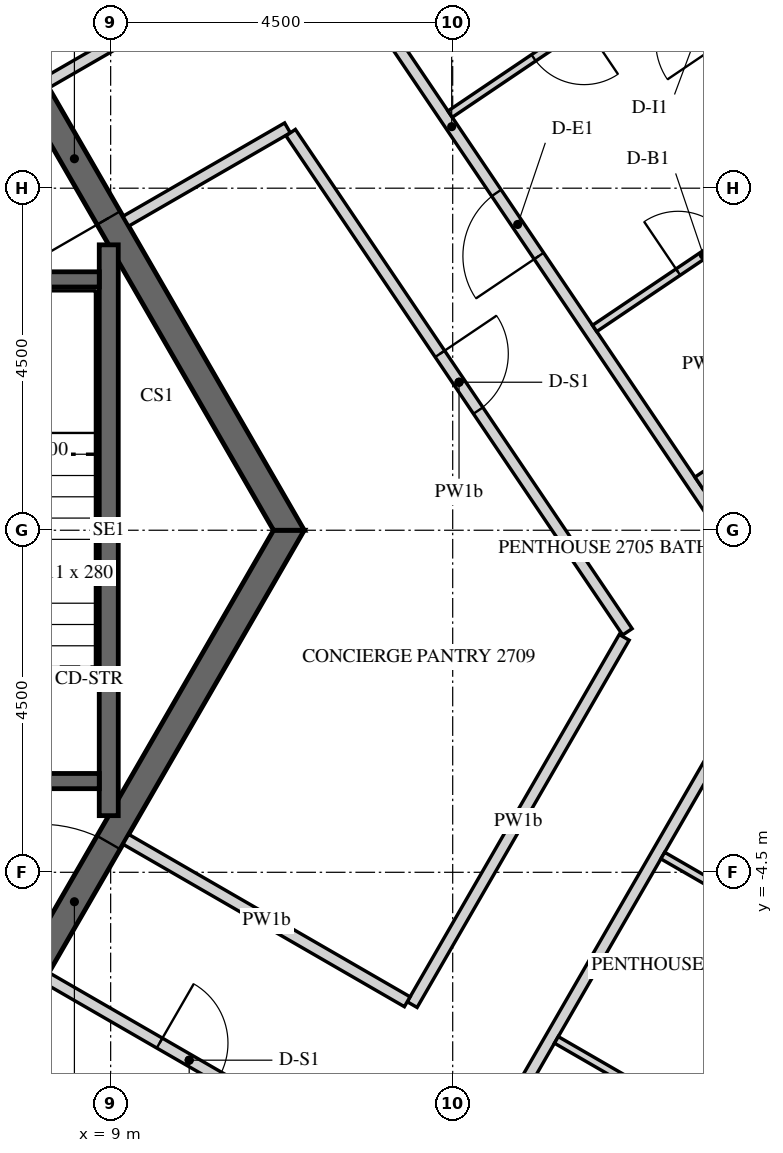
"""IFC4 building model, lengths in metres.
Left out: names, types, materials, properties, quantities, classifications, styles, units other than length and angle.
Written with IfcOpenShell. Run it as: python <this file> out.ifc"""

import sys

from ifc_helpers import new_model, si_unit, direction, frame, frame_2d, origin, place, context, subcontext, project, spatial, polyline, rectangle, outline, extrude, element, fill, save


model = new_model("IFC4")
c1 = context("Model", 3, precision=1e-05, world=origin(), true_north=direction((0.0, 1.0)))
c2 = subcontext(c1, "Body", "Model", "MODEL_VIEW")
j1 = project(units=[si_unit("LENGTHUNIT", "METRE"), si_unit("PLANEANGLEUNIT", "RADIAN")], contexts=[c1])
p1 = place(None, origin())
s1 = spatial("IfcSite", under=j1, at=p1, CompositionType="ELEMENT")
p2 = place(p1, origin())
s2 = spatial("IfcBuilding", under=s1, at=p2, CompositionType="ELEMENT")
p3 = place(p2, frame((0.0, 0.0, 353.4)))
s3 = spatial("IfcBuildingStorey", under=s2, at=p3, CompositionType="ELEMENT", Elevation=353.4)
p4 = place(p3, frame((15.273, -21.097, -0.15), z_axis=(0.0, 0.0, 1.0), x_axis=(0.499997453958, 0.866026873738, 0.0)))
e1 = element("IfcWall", 1, at=p4, inside=s3, PredefinedType="SOLIDWALL", context=c2, shape_type="SweptSolid", body=[
    extrude(outline(polyline([(-0.018, -0.225), (23.152, -0.225), (23.11, 0.225), (0.018, 0.225), (-0.018, -0.225)])), origin(), (0.0, 0.0, 1.0), 3.9),
])
p5 = place(p4, frame((1.366, 0.0, 0.45)))
e2 = element("IfcOpeningElement", 2, at=p5, cuts=e1, PredefinedType="OPENING", context=c2, shape_type="SweptSolid", body=[
    extrude(rectangle(XDim=2.4, YDim=3.0, at=frame_2d((1.2, 1.5))), frame((0.0, 0.235, 0.0), z_axis=(0.0, -1.0, 0.0), x_axis=(1.0, 0.0, 0.0)), (0.0, 0.0, 1.0), 0.47),
])
p6 = place(p4, frame((4.966, 0.0, 0.45)))
e3 = element("IfcOpeningElement", 3, at=p6, cuts=e1, PredefinedType="OPENING", context=c2, shape_type="SweptSolid", body=[
    extrude(rectangle(XDim=2.4, YDim=3.0, at=frame_2d((1.2, 1.5))), frame((0.0, 0.235, 0.0), z_axis=(0.0, -1.0, 0.0), x_axis=(1.0, 0.0, 0.0)), (0.0, 0.0, 1.0), 0.47),
])
p7 = place(p4, frame((8.566, 0.0, 0.45)))
e4 = element("IfcOpeningElement", 4, at=p7, cuts=e1, PredefinedType="OPENING", context=c2, shape_type="SweptSolid", body=[
    extrude(rectangle(XDim=2.4, YDim=3.0, at=frame_2d((1.2, 1.5))), frame((0.0, 0.235, 0.0), z_axis=(0.0, -1.0, 0.0), x_axis=(1.0, 0.0, 0.0)), (0.0, 0.0, 1.0), 0.47),
])
p8 = place(p4, frame((12.166, 0.0, 0.45)))
e5 = element("IfcOpeningElement", 5, at=p8, cuts=e1, PredefinedType="OPENING", context=c2, shape_type="SweptSolid", body=[
    extrude(rectangle(XDim=2.4, YDim=3.0, at=frame_2d((1.2, 1.5))), frame((0.0, 0.235, 0.0), z_axis=(0.0, -1.0, 0.0), x_axis=(1.0, 0.0, 0.0)), (0.0, 0.0, 1.0), 0.47),
])
p9 = place(p4, frame((15.766, 0.0, 0.45)))
e6 = element("IfcOpeningElement", 6, at=p9, cuts=e1, PredefinedType="OPENING", context=c2, shape_type="SweptSolid", body=[
    extrude(rectangle(XDim=2.4, YDim=3.0, at=frame_2d((1.2, 1.5))), frame((0.0, 0.235, 0.0), z_axis=(0.0, -1.0, 0.0), x_axis=(1.0, 0.0, 0.0)), (0.0, 0.0, 1.0), 0.47),
])
p10 = place(p4, frame((19.366, 0.0, 0.45)))
e7 = element("IfcOpeningElement", 7, at=p10, cuts=e1, PredefinedType="OPENING", context=c2, shape_type="SweptSolid", body=[
    extrude(rectangle(XDim=2.4, YDim=3.0, at=frame_2d((1.2, 1.5))), frame((0.0, 0.235, 0.0), z_axis=(0.0, -1.0, 0.0), x_axis=(1.0, 0.0, 0.0)), (0.0, 0.0, 1.0), 0.47),
])
p11 = place(p3, frame((24.37, 2.811, -0.15), z_axis=(0.0, 0.0, 1.0), x_axis=(-0.559187034749, 0.829041531027, 0.0)))
e8 = element("IfcWall", 8, at=p11, inside=s3, PredefinedType="SOLIDWALL", context=c2, shape_type="SweptSolid", body=[
    extrude(outline(polyline([(0.225, -0.225), (20.506, -0.225), (20.957, 0.225), (-0.225, 0.225), (0.225, -0.225)])), origin(), (0.0, 0.0, 1.0), 3.9),
])
p12 = place(p11, frame((0.325, 0.0, 1.05)))
e9 = element("IfcOpeningElement", 9, at=p12, cuts=e8, PredefinedType="OPENING", context=c2, shape_type="SweptSolid", body=[
    extrude(rectangle(XDim=0.9, YDim=1.5, at=frame_2d((0.45, 0.75))), frame((0.0, 0.235, 0.0), z_axis=(0.0, -1.0, 0.0), x_axis=(1.0, 0.0, 0.0)), (0.0, 0.0, 1.0), 0.47),
])
p13 = place(p11, frame((1.525, 0.0, 0.15)))
e10 = element("IfcOpeningElement", 10, at=p13, cuts=e8, PredefinedType="OPENING", context=c2, shape_type="SweptSolid", body=[
    extrude(rectangle(XDim=1.2, YDim=2.4, at=frame_2d((0.6, 1.2))), frame((0.0, 0.235, 0.0), z_axis=(0.0, -1.0, 0.0), x_axis=(1.0, 0.0, 0.0)), (0.0, 0.0, 1.0), 0.47),
])
p14 = place(p11, frame((3.766, 0.0, 1.05)))
e11 = element("IfcOpeningElement", 11, at=p14, cuts=e8, PredefinedType="OPENING", context=c2, shape_type="SweptSolid", body=[
    extrude(rectangle(XDim=0.9, YDim=1.5, at=frame_2d((0.45, 0.75))), frame((0.0, 0.235, 0.0), z_axis=(0.0, -1.0, 0.0), x_axis=(1.0, 0.0, 0.0)), (0.0, 0.0, 1.0), 0.47),
])
p15 = place(p11, frame((4.966, 0.0, 0.15)))
e12 = element("IfcOpeningElement", 12, at=p15, cuts=e8, PredefinedType="OPENING", context=c2, shape_type="SweptSolid", body=[
    extrude(rectangle(XDim=1.2, YDim=2.4, at=frame_2d((0.6, 1.2))), frame((0.0, 0.235, 0.0), z_axis=(0.0, -1.0, 0.0), x_axis=(1.0, 0.0, 0.0)), (0.0, 0.0, 1.0), 0.47),
])
p16 = place(p11, frame((7.366, 0.0, 1.05)))
e13 = element("IfcOpeningElement", 13, at=p16, cuts=e8, PredefinedType="OPENING", context=c2, shape_type="SweptSolid", body=[
    extrude(rectangle(XDim=0.9, YDim=1.5, at=frame_2d((0.45, 0.75))), frame((0.0, 0.235, 0.0), z_axis=(0.0, -1.0, 0.0), x_axis=(1.0, 0.0, 0.0)), (0.0, 0.0, 1.0), 0.47),
])
p17 = place(p11, frame((8.566, 0.0, 0.15)))
e14 = element("IfcOpeningElement", 14, at=p17, cuts=e8, PredefinedType="OPENING", context=c2, shape_type="SweptSolid", body=[
    extrude(rectangle(XDim=1.2, YDim=2.4, at=frame_2d((0.6, 1.2))), frame((0.0, 0.235, 0.0), z_axis=(0.0, -1.0, 0.0), x_axis=(1.0, 0.0, 0.0)), (0.0, 0.0, 1.0), 0.47),
])
p18 = place(p11, frame((10.966, 0.0, 1.05)))
e15 = element("IfcOpeningElement", 15, at=p18, cuts=e8, PredefinedType="OPENING", context=c2, shape_type="SweptSolid", body=[
    extrude(rectangle(XDim=0.9, YDim=1.5, at=frame_2d((0.45, 0.75))), frame((0.0, 0.235, 0.0), z_axis=(0.0, -1.0, 0.0), x_axis=(1.0, 0.0, 0.0)), (0.0, 0.0, 1.0), 0.47),
])
p19 = place(p11, frame((12.166, 0.0, 0.15)))
e16 = element("IfcOpeningElement", 16, at=p19, cuts=e8, PredefinedType="OPENING", context=c2, shape_type="SweptSolid", body=[
    extrude(rectangle(XDim=1.2, YDim=2.4, at=frame_2d((0.6, 1.2))), frame((0.0, 0.235, 0.0), z_axis=(0.0, -1.0, 0.0), x_axis=(1.0, 0.0, 0.0)), (0.0, 0.0, 1.0), 0.47),
])
p20 = place(p11, frame((14.566, 0.0, 1.05)))
e17 = element("IfcOpeningElement", 17, at=p20, cuts=e8, PredefinedType="OPENING", context=c2, shape_type="SweptSolid", body=[
    extrude(rectangle(XDim=0.9, YDim=1.5, at=frame_2d((0.45, 0.75))), frame((0.0, 0.235, 0.0), z_axis=(0.0, -1.0, 0.0), x_axis=(1.0, 0.0, 0.0)), (0.0, 0.0, 1.0), 0.47),
])
p21 = place(p11, frame((15.766, 0.0, 0.15)))
e18 = element("IfcOpeningElement", 18, at=p21, cuts=e8, PredefinedType="OPENING", context=c2, shape_type="SweptSolid", body=[
    extrude(rectangle(XDim=1.2, YDim=2.4, at=frame_2d((0.6, 1.2))), frame((0.0, 0.235, 0.0), z_axis=(0.0, -1.0, 0.0), x_axis=(1.0, 0.0, 0.0)), (0.0, 0.0, 1.0), 0.47),
])
p22 = place(p11, frame((18.007, 0.0, 1.05)))
e19 = element("IfcOpeningElement", 19, at=p22, cuts=e8, PredefinedType="OPENING", context=c2, shape_type="SweptSolid", body=[
    extrude(rectangle(XDim=0.9, YDim=1.5, at=frame_2d((0.45, 0.75))), frame((0.0, 0.235, 0.0), z_axis=(0.0, -1.0, 0.0), x_axis=(1.0, 0.0, 0.0)), (0.0, 0.0, 1.0), 0.47),
])
p23 = place(p11, frame((19.207, 0.0, 0.15)))
e20 = element("IfcOpeningElement", 20, at=p23, cuts=e8, PredefinedType="OPENING", context=c2, shape_type="SweptSolid", body=[
    extrude(rectangle(XDim=1.2, YDim=2.4, at=frame_2d((0.6, 1.2))), frame((0.0, 0.235, 0.0), z_axis=(0.0, -1.0, 0.0), x_axis=(1.0, 0.0, 0.0)), (0.0, 0.0, 1.0), 0.47),
])
p24 = place(p3, frame((5.673, -9.825, -0.15), z_axis=(0.0, 0.0, 1.0), x_axis=(0.499995046907, 0.866028263435, 0.0)))
e21 = element("IfcWall", 21, at=p24, inside=s3, PredefinedType="SHEAR", context=c2, shape_type="SweptSolid", body=[
    extrude(outline(polyline([(-0.101, -0.175), (11.446, -0.175), (11.244, 0.175), (0.101, 0.175), (-0.101, -0.175)])), origin(), (0.0, 0.0, 1.0), 3.9),
])
p25 = place(p24, frame((4.801, 0.0, 0.15)))
e22 = element("IfcOpeningElement", 22, at=p25, cuts=e21, PredefinedType="OPENING", context=c2, shape_type="SweptSolid", body=[
    extrude(rectangle(XDim=1.8, YDim=2.4, at=frame_2d((0.9, 1.2))), frame((0.0, 0.185, 0.0), z_axis=(0.0, -1.0, 0.0), x_axis=(1.0, 0.0, 0.0)), (0.0, 0.0, 1.0), 0.37),
])
p26 = place(p3, frame((11.345, 0.0, -0.15), z_axis=(0.0, 0.0, 1.0), x_axis=(-0.499995046907, 0.866028263435, 0.0)))
e23 = element("IfcWall", 23, at=p26, inside=s3, PredefinedType="SHEAR", context=c2, shape_type="SweptSolid", body=[
    extrude(outline(polyline([(-0.101, -0.175), (11.446, -0.175), (11.244, 0.175), (0.101, 0.175), (-0.101, -0.175)])), origin(), (0.0, 0.0, 1.0), 3.9),
])
p27 = place(p26, frame((4.744, 0.0, 0.15)))
e24 = element("IfcOpeningElement", 24, at=p27, cuts=e23, PredefinedType="OPENING", context=c2, shape_type="SweptSolid", body=[
    extrude(rectangle(XDim=1.8, YDim=2.4, at=frame_2d((0.9, 1.2))), frame((0.0, 0.185, 0.0), z_axis=(0.0, -1.0, 0.0), x_axis=(1.0, 0.0, 0.0)), (0.0, 0.0, 1.0), 0.37),
])
p28 = place(p3, frame((8.975, -3.755, -0.25), z_axis=(0.0, 0.0, 1.0), x_axis=(0.0, 1.0, 0.0)))
e25 = element("IfcWall", 25, at=p28, inside=s3, PredefinedType="SHEAR", context=c2, shape_type="SweptSolid", body=[
    extrude(rectangle(XDim=7.51, YDim=0.25, at=frame_2d((3.755, 0.0))), origin(), (0.0, 0.0, 1.0), 3.9),
])
p29 = place(p3, frame((5.9, 3.3, -0.25), z_axis=(0.0, 0.0, 1.0), x_axis=(1.0, 0.0, 0.0)))
e26 = element("IfcWall", 26, at=p29, inside=s3, PredefinedType="SHEAR", context=c2, shape_type="SweptSolid", body=[
    extrude(rectangle(XDim=2.95, YDim=0.2, at=frame_2d((1.475, 0.0))), origin(), (0.0, 0.0, 1.0), 3.9),
])
p30 = place(p3, frame((5.9, -3.3, -0.25), z_axis=(0.0, 0.0, 1.0), x_axis=(1.0, 0.0, 0.0)))
e27 = element("IfcWall", 27, at=p30, inside=s3, PredefinedType="SHEAR", context=c2, shape_type="SweptSolid", body=[
    extrude(rectangle(XDim=2.95, YDim=0.2, at=frame_2d((1.475, 0.0))), origin(), (0.0, 0.0, 1.0), 3.9),
])
p31 = place(p30, frame((0.875, 0.0, 0.25)))
e28 = element("IfcOpeningElement", 28, at=p31, cuts=e27, PredefinedType="OPENING", context=c2, shape_type="SweptSolid", body=[
    extrude(rectangle(XDim=1.2, YDim=2.4, at=frame_2d((0.6, 1.2))), frame((0.0, 0.11, 0.0), z_axis=(0.0, -1.0, 0.0), x_axis=(1.0, 0.0, 0.0)), (0.0, 0.0, 1.0), 0.22),
])
p32 = place(p3, frame((10.937, -13.357, 0.0), z_axis=(0.0, 0.0, 1.0), x_axis=(0.499993317597, 0.866029261837, 0.0)))
e29 = element("IfcWall", 29, at=p32, inside=s3, PredefinedType="PARTITIONING", context=c2, shape_type="SweptSolid", body=[
    extrude(rectangle(XDim=13.966, YDim=0.15, at=frame_2d((6.983, 0.0))), origin(), (0.0, 0.0, 1.0), 2.82),
])
p33 = place(p32, frame((3.325, 0.0, 0.0)))
e30 = element("IfcOpeningElement", 30, at=p33, cuts=e29, PredefinedType="OPENING", context=c2, shape_type="SweptSolid", body=[
    extrude(rectangle(XDim=1.0, YDim=2.1, at=frame_2d((0.5, 1.05))), frame((0.0, 0.085, 0.0), z_axis=(0.0, -1.0, 0.0), x_axis=(1.0, 0.0, 0.0)), (0.0, 0.0, 1.0), 0.17),
])
p34 = place(p3, frame((17.873, -1.193, 0.0), z_axis=(0.0, 0.0, 1.0), x_axis=(-0.559195650252, 0.829035719821, 0.0)))
e31 = element("IfcWall", 31, at=p34, inside=s3, PredefinedType="PARTITIONING", context=c2, shape_type="SweptSolid", body=[
    extrude(rectangle(XDim=15.688, YDim=0.15, at=frame_2d((7.844, 0.0))), origin(), (0.0, 0.0, 1.0), 2.82),
])
p35 = place(p34, frame((5.792, 0.0, 0.0)))
e32 = element("IfcOpeningElement", 32, at=p35, cuts=e31, PredefinedType="OPENING", context=c2, shape_type="SweptSolid", body=[
    extrude(rectangle(XDim=1.0, YDim=2.1, at=frame_2d((0.5, 1.05))), frame((0.0, 0.085, 0.0), z_axis=(0.0, -1.0, 0.0), x_axis=(1.0, 0.0, 0.0)), (0.0, 0.0, 1.0), 0.17),
])
p36 = place(p3, frame((9.2, 4.066, 0.0), z_axis=(0.0, 0.0, 1.0), x_axis=(0.866038240688, 0.499977765172, 0.0)))
e33 = element("IfcWall", 33, at=p36, inside=s3, PredefinedType="PARTITIONING", context=c2, shape_type="SweptSolid", body=[
    extrude(rectangle(XDim=2.456, YDim=0.15, at=frame_2d((1.228, 0.0))), origin(), (0.0, 0.0, 1.0), 2.82),
])
p37 = place(p3, frame((11.368, 5.231, 0.0), z_axis=(0.0, 0.0, 1.0), x_axis=(0.55919388604, -0.829036909803, 0.0)))
e34 = element("IfcWall", 34, at=p37, inside=s3, PredefinedType="PARTITIONING", context=c2, shape_type="SweptSolid", body=[
    extrude(rectangle(XDim=7.922, YDim=0.15, at=frame_2d((3.961, 0.0))), origin(), (0.0, 0.0, 1.0), 2.82),
])
p38 = place(p37, frame((3.511, 0.0, 0.0)))
e35 = element("IfcOpeningElement", 35, at=p38, cuts=e34, PredefinedType="OPENING", context=c2, shape_type="SweptSolid", body=[
    extrude(rectangle(XDim=0.9, YDim=2.1, at=frame_2d((0.45, 1.05))), frame((0.0, 0.085, 0.0), z_axis=(0.0, -1.0, 0.0), x_axis=(1.0, 0.0, 0.0)), (0.0, 0.0, 1.0), 0.17),
])
p39 = place(p3, frame((15.757, -1.409, 0.0), z_axis=(0.0, 0.0, 1.0), x_axis=(-0.500002739321, -0.866023822231, 0.0)))
e36 = element("IfcWall", 36, at=p39, inside=s3, PredefinedType="PARTITIONING", context=c2, shape_type="SweptSolid", body=[
    extrude(rectangle(XDim=5.58, YDim=0.15, at=frame_2d((2.79, 0.0))), origin(), (0.0, 0.0, 1.0), 2.82),
])
p40 = place(p3, frame((12.902, -6.203, 0.0), z_axis=(0.0, 0.0, 1.0), x_axis=(-0.866023907196, 0.500002592159, 0.0)))
e37 = element("IfcWall", 37, at=p40, inside=s3, PredefinedType="PARTITIONING", context=c2, shape_type="SweptSolid", body=[
    extrude(rectangle(XDim=4.275, YDim=0.15, at=frame_2d((2.137, 0.0))), origin(), (0.0, 0.0, 1.0), 2.82),
])
p41 = place(p3, frame((8.15, -5.884, 0.0), z_axis=(0.0, 0.0, 1.0), x_axis=(0.866027639635, -0.499996127374, 0.0)))
e38 = element("IfcWall", 38, at=p41, inside=s3, PredefinedType="PARTITIONING", context=c2, shape_type="SweptSolid", body=[
    extrude(rectangle(XDim=4.35, YDim=0.15, at=frame_2d((2.175, 0.0))), origin(), (0.0, 0.0, 1.0), 2.82),
])
p42 = place(p41, frame((1.725, 0.0, 0.0)))
e39 = element("IfcOpeningElement", 39, at=p42, cuts=e38, PredefinedType="OPENING", context=c2, shape_type="SweptSolid", body=[
    extrude(rectangle(XDim=0.9, YDim=2.1, at=frame_2d((0.45, 1.05))), frame((0.0, 0.085, 0.0), z_axis=(0.0, -1.0, 0.0), x_axis=(1.0, 0.0, 0.0)), (0.0, 0.0, 1.0), 0.17),
])
p43 = place(p3, frame((10.084, 7.001, 0.0), z_axis=(0.0, 0.0, 1.0), x_axis=(-0.865994457699, -0.500053596362, 0.0)))
e40 = element("IfcWall", 40, at=p43, inside=s3, PredefinedType="PARTITIONING", context=c2, shape_type="SweptSolid", body=[
    extrude(rectangle(XDim=2.234, YDim=0.15, at=frame_2d((1.117, 0.0))), origin(), (0.0, 0.0, 1.0), 2.82),
])
p44 = place(p3, frame((16.264, -4.28, 0.0), z_axis=(0.0, 0.0, 1.0), x_axis=(0.866037464623, -0.499979109433, 0.0)))
e41 = element("IfcWall", 41, at=p44, inside=s3, PredefinedType="PARTITIONING", context=c2, shape_type="SweptSolid", body=[
    extrude(rectangle(XDim=3.925, YDim=0.1, at=frame_2d((1.962, 0.0))), origin(), (0.0, 0.0, 1.0), 2.82),
])
p45 = place(p3, frame((19.66, 2.595, 0.0), z_axis=(0.0, 0.0, 1.0), x_axis=(-0.829033300448, -0.559199237078, 0.0)))
e42 = element("IfcWall", 42, at=p45, inside=s3, PredefinedType="PARTITIONING", context=c2, shape_type="SweptSolid", body=[
    extrude(rectangle(XDim=3.525, YDim=0.18, at=frame_2d((1.763, 0.0))), origin(), (0.0, 0.0, 1.0), 2.82),
])
p46 = place(p3, frame((18.22, -8.642, 0.0), z_axis=(0.0, 0.0, 1.0), x_axis=(-0.866016658288, 0.500015147339, 0.0)))
e43 = element("IfcWall", 43, at=p46, inside=s3, PredefinedType="PARTITIONING", context=c2, shape_type="SweptSolid", body=[
    extrude(rectangle(XDim=3.875, YDim=0.1, at=frame_2d((1.938, 0.0))), origin(), (0.0, 0.0, 1.0), 2.82),
])
p47 = place(p3, frame((15.367, 2.655, 0.0), z_axis=(0.0, 0.0, 1.0), x_axis=(0.829033300448, 0.559199237078, 0.0)))
e44 = element("IfcWall", 44, at=p47, inside=s3, PredefinedType="PARTITIONING", context=c2, shape_type="SweptSolid", body=[
    extrude(rectangle(XDim=3.525, YDim=0.1, at=frame_2d((1.763, 0.0))), origin(), (0.0, 0.0, 1.0), 2.82),
])
p48 = place(p47, frame((1.325, 0.0, 0.0)))
e45 = element("IfcOpeningElement", 45, at=p48, cuts=e44, PredefinedType="OPENING", context=c2, shape_type="SweptSolid", body=[
    extrude(rectangle(XDim=0.8, YDim=2.1, at=frame_2d((0.4, 1.05))), frame((0.0, 0.06, 0.0), z_axis=(0.0, -1.0, 0.0), x_axis=(1.0, 0.0, 0.0)), (0.0, 0.0, 1.0), 0.12),
])
p49 = place(p3, frame((18.291, 4.625, 0.0), z_axis=(0.0, 0.0, 1.0), x_axis=(-0.55916115895, 0.82905898362, 0.0)))
e46 = element("IfcWall", 46, at=p49, inside=s3, PredefinedType="PARTITIONING", context=c2, shape_type="SweptSolid", body=[
    extrude(rectangle(XDim=3.404, YDim=0.1, at=frame_2d((1.702, 0.0))), origin(), (0.0, 0.0, 1.0), 2.82),
])
p50 = place(p49, frame((0.762, 0.0, 0.0)))
e47 = element("IfcOpeningElement", 47, at=p50, cuts=e46, PredefinedType="OPENING", context=c2, shape_type="SweptSolid", body=[
    extrude(rectangle(XDim=0.9, YDim=2.1, at=frame_2d((0.45, 1.05))), frame((0.0, 0.06, 0.0), z_axis=(0.0, -1.0, 0.0), x_axis=(1.0, 0.0, 0.0)), (0.0, 0.0, 1.0), 0.12),
])
p51 = place(p49, frame((2.182, 0.0, 0.0)))
e48 = element("IfcOpeningElement", 48, at=p51, cuts=e46, PredefinedType="OPENING", context=c2, shape_type="SweptSolid", body=[
    extrude(rectangle(XDim=0.9, YDim=2.1, at=frame_2d((0.45, 1.05))), frame((0.0, 0.06, 0.0), z_axis=(0.0, -1.0, 0.0), x_axis=(1.0, 0.0, 0.0)), (0.0, 0.0, 1.0), 0.12),
])
p52 = place(p3, frame((16.388, 7.445, 0.0), z_axis=(0.0, 0.0, 1.0), x_axis=(-0.829033300448, -0.559199237078, 0.0)))
e49 = element("IfcWall", 49, at=p52, inside=s3, PredefinedType="PARTITIONING", context=c2, shape_type="SweptSolid", body=[
    extrude(rectangle(XDim=3.525, YDim=0.1, at=frame_2d((1.763, 0.0))), origin(), (0.0, 0.0, 1.0), 2.82),
])
p53 = place(p52, frame((1.4, 0.0, 0.0)))
e50 = element("IfcOpeningElement", 50, at=p53, cuts=e49, PredefinedType="OPENING", context=c2, shape_type="SweptSolid", body=[
    extrude(rectangle(XDim=0.8, YDim=2.1, at=frame_2d((0.4, 1.05))), frame((0.0, 0.06, 0.0), z_axis=(0.0, -1.0, 0.0), x_axis=(1.0, 0.0, 0.0)), (0.0, 0.0, 1.0), 0.12),
])
p54 = place(p27, origin())
e51 = element("IfcDoor", 51, at=p54, inside=s3, OperationType="DOUBLE_DOOR_SINGLE_SWING", PredefinedType="DOOR", context=c2, shape_type="SweptSolid", body=[
    extrude(rectangle(XDim=1.8, YDim=2.4, at=frame_2d((0.9, 1.2))), frame((0.0, 0.025, 0.0), z_axis=(0.0, -1.0, 0.0), x_axis=(1.0, 0.0, 0.0)), (0.0, 0.0, 1.0), 0.05),
])
fill(e24, e51)
p55 = place(p25, origin())
e52 = element("IfcDoor", 52, at=p55, inside=s3, OperationType="DOUBLE_DOOR_SINGLE_SWING", PredefinedType="DOOR", context=c2, shape_type="SweptSolid", body=[
    extrude(rectangle(XDim=1.8, YDim=2.4, at=frame_2d((0.9, 1.2))), frame((0.0, 0.025, 0.0), z_axis=(0.0, -1.0, 0.0), x_axis=(1.0, 0.0, 0.0)), (0.0, 0.0, 1.0), 0.05),
])
fill(e22, e52)
p56 = place(p35, origin())
e53 = element("IfcDoor", 53, at=p56, inside=s3, OperationType="SINGLE_SWING_LEFT", PredefinedType="DOOR", context=c2, shape_type="SweptSolid", body=[
    extrude(rectangle(XDim=1.0, YDim=2.1, at=frame_2d((0.5, 1.05))), frame((0.0, 0.025, 0.0), z_axis=(0.0, -1.0, 0.0), x_axis=(1.0, 0.0, 0.0)), (0.0, 0.0, 1.0), 0.05),
])
fill(e32, e53)
p57 = place(p48, origin())
e54 = element("IfcDoor", 54, at=p57, inside=s3, OperationType="SINGLE_SWING_RIGHT", PredefinedType="DOOR", context=c2, shape_type="SweptSolid", body=[
    extrude(rectangle(XDim=0.8, YDim=2.1, at=frame_2d((0.4, 1.05))), frame((0.0, 0.025, 0.0), z_axis=(0.0, -1.0, 0.0), x_axis=(1.0, 0.0, 0.0)), (0.0, 0.0, 1.0), 0.05),
])
fill(e45, e54)
p58 = place(p53, origin())
e55 = element("IfcDoor", 55, at=p58, inside=s3, OperationType="SINGLE_SWING_LEFT", PredefinedType="DOOR", context=c2, shape_type="SweptSolid", body=[
    extrude(rectangle(XDim=0.8, YDim=2.1, at=frame_2d((0.4, 1.05))), frame((0.0, 0.025, 0.0), z_axis=(0.0, -1.0, 0.0), x_axis=(1.0, 0.0, 0.0)), (0.0, 0.0, 1.0), 0.05),
])
fill(e50, e55)
p59 = place(p38, origin())
e56 = element("IfcDoor", 56, at=p59, inside=s3, OperationType="SINGLE_SWING_RIGHT", PredefinedType="DOOR", context=c2, shape_type="SweptSolid", body=[
    extrude(rectangle(XDim=0.9, YDim=2.1, at=frame_2d((0.45, 1.05))), frame((0.0, 0.025, 0.0), z_axis=(0.0, -1.0, 0.0), x_axis=(1.0, 0.0, 0.0)), (0.0, 0.0, 1.0), 0.05),
])
fill(e35, e56)
p60 = place(p42, origin())
e57 = element("IfcDoor", 57, at=p60, inside=s3, OperationType="SINGLE_SWING_LEFT", PredefinedType="DOOR", context=c2, shape_type="SweptSolid", body=[
    extrude(rectangle(XDim=0.9, YDim=2.1, at=frame_2d((0.45, 1.05))), frame((0.0, 0.025, 0.0), z_axis=(0.0, -1.0, 0.0), x_axis=(1.0, 0.0, 0.0)), (0.0, 0.0, 1.0), 0.05),
])
fill(e39, e57)
save(model, sys.argv[1])
